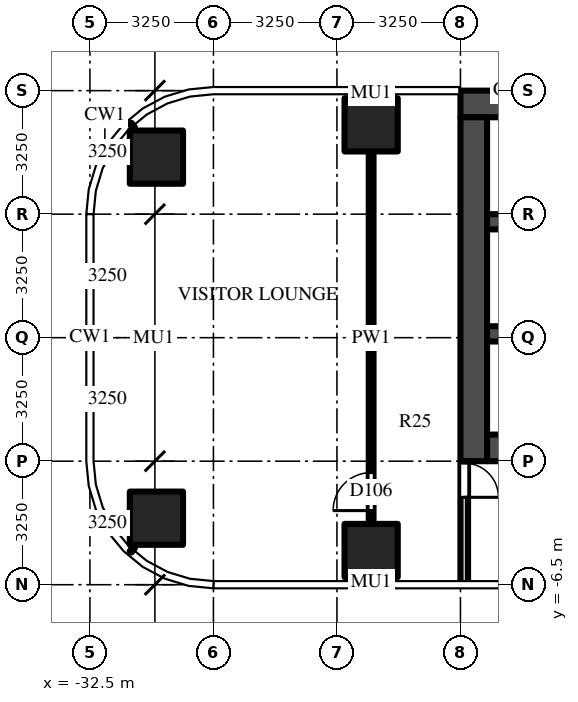
"""IFC4 building model, lengths in metres.
Left out: names, types, materials, properties, quantities, classifications, styles, units other than length and angle.
Written with IfcOpenShell. Run it as: python <this file> out.ifc"""

import sys

from ifc_helpers import new_model, si_unit, direction, frame, frame_2d, origin, origin_2d, place, context, subcontext, project, spatial, rectangle, extrude, source, transform, mapped, element, fill, save


model = new_model("IFC4")
c1 = context("Model", 3, precision=1e-05, world=origin(), true_north=direction((0.0, 1.0)))
c2 = subcontext(c1, "Body", "Model", "MODEL_VIEW")
j1 = project(units=[si_unit("LENGTHUNIT", "METRE"), si_unit("PLANEANGLEUNIT", "RADIAN")], contexts=[c1])
p1 = place(None, origin())
s1 = spatial("IfcSite", under=j1, at=p1, CompositionType="ELEMENT")
p2 = place(p1, origin())
s2 = spatial("IfcBuilding", under=s1, at=p2, CompositionType="ELEMENT")
p3 = place(p2, frame((0.0, 0.0, 47.5)))
s3 = spatial("IfcBuildingStorey", under=s2, at=p3, CompositionType="ELEMENT", Elevation=47.5)
m1 = source(origin(), c2, "Body", "SweptSolid", [
    extrude(rectangle(XDim=1.4, YDim=1.4, at=origin_2d()), origin(), (0.0, 0.0, 1.0), 4.5),
])
for number, where, z_axis, x_axis in (
    (1, (-25.1, -5.6, 0.0), (0.0, 0.0, 1.0), (1.0, 0.0, 0.0)),
    (2, (-30.75, -4.75, 0.0), (0.0, 0.0, 1.0), (1.0, 0.0, 0.0)),
    (3, (-25.1, 5.6, 0.0), (0.0, 0.0, 1.0), (1.0, 0.0, 0.0)),
    (4, (-30.75, 4.75, 0.0), (0.0, 0.0, 1.0), (1.0, 0.0, 0.0)),
):
    element("IfcColumn", number, at=place(p3, frame(where, z_axis=z_axis, x_axis=x_axis)), inside=s3, PredefinedType="COLUMN", context=c2, shape_type="MappedRepresentation", body=[
        mapped(m1, transform((0.0, 0.0, 0.0))),
    ])
m2 = source(origin(), c2, "Body", "SweptSolid", [
    extrude(rectangle(XDim=16.45, YDim=0.7, at=frame_2d((8.225, 0.0))), origin(), (0.0, 0.0, 1.0), 4.25),
])
p4 = place(p3, frame((-6.3, 6.15, 0.0), z_axis=(0.0, 0.0, 1.0), x_axis=(-1.0, 0.0, 0.0)))
e5 = element("IfcWall", 5, at=p4, inside=s3, PredefinedType="SHEAR", context=c2, shape_type="MappedRepresentation", body=[
    mapped(m2, transform((0.0, 0.0, 0.0))),
])
m3 = source(origin(), c2, "Body", "SweptSolid", [
    extrude(rectangle(XDim=14.85, YDim=0.7, at=frame_2d((7.425, 0.0))), origin(), (0.0, 0.0, 1.0), 4.25),
])
p5 = place(p3, frame((-7.2, -2.9, 0.0), z_axis=(0.0, 0.0, 1.0), x_axis=(-1.0, 0.0, 0.0)))
e6 = element("IfcWall", 6, at=p5, inside=s3, PredefinedType="SHEAR", context=c2, shape_type="MappedRepresentation", body=[
    mapped(m3, transform((0.0, 0.0, 0.0))),
])
m4 = source(origin(), c2, "Body", "SweptSolid", [
    extrude(rectangle(XDim=1.3, YDim=2.1, at=frame_2d((0.65, 1.05))), frame((0.0, 0.36, 0.0), z_axis=(0.0, -1.0, 0.0), x_axis=(1.0, 0.0, 0.0)), (0.0, 0.0, 1.0), 0.72),
])
p6 = place(p5, frame((12.2, 0.0, 0.0)))
e7 = element("IfcOpeningElement", 7, at=p6, cuts=e6, PredefinedType="OPENING", context=c2, shape_type="MappedRepresentation", body=[
    mapped(m4, transform((0.0, 0.0, 0.0))),
])
m5 = source(origin(), c2, "Body", "SweptSolid", [
    extrude(rectangle(XDim=1.2, YDim=2.1, at=frame_2d((0.6, 1.05))), frame((0.0, 0.36, 0.0), z_axis=(0.0, -1.0, 0.0), x_axis=(1.0, 0.0, 0.0)), (0.0, 0.0, 1.0), 0.72),
])
p7 = place(p5, frame((9.85, 0.0, 0.0)))
e8 = element("IfcOpeningElement", 8, at=p7, cuts=e6, PredefinedType="OPENING", context=c2, shape_type="MappedRepresentation", body=[
    mapped(m5, transform((0.0, 0.0, 0.0))),
])
m6 = source(origin(), c2, "Body", "SweptSolid", [
    extrude(rectangle(XDim=1.0, YDim=2.1, at=frame_2d((0.5, 1.05))), frame((0.0, 0.36, 0.0), z_axis=(0.0, -1.0, 0.0), x_axis=(1.0, 0.0, 0.0)), (0.0, 0.0, 1.0), 0.72),
])
p8 = place(p5, frame((7.9, 0.0, 0.0)))
e9 = element("IfcOpeningElement", 9, at=p8, cuts=e6, PredefinedType="OPENING", context=c2, shape_type="MappedRepresentation", body=[
    mapped(m6, transform((0.0, 0.0, 0.0))),
])
m7 = source(origin(), c2, "Body", "SweptSolid", [
    extrude(rectangle(XDim=0.8, YDim=2.1, at=frame_2d((0.4, 1.05))), frame((0.0, 0.36, 0.0), z_axis=(0.0, -1.0, 0.0), x_axis=(1.0, 0.0, 0.0)), (0.0, 0.0, 1.0), 0.72),
])
p9 = place(p5, frame((0.113, 0.0, 0.0)))
e10 = element("IfcOpeningElement", 10, at=p9, cuts=e6, PredefinedType="OPENING", context=c2, shape_type="MappedRepresentation", body=[
    mapped(m7, transform((0.0, 0.0, 0.0))),
])
p10 = place(p5, frame((1.288, 0.0, 0.0)))
e11 = element("IfcOpeningElement", 11, at=p10, cuts=e6, PredefinedType="OPENING", context=c2, shape_type="MappedRepresentation", body=[
    mapped(m7, transform((0.0, 0.0, 0.0))),
])
p11 = place(p5, frame((2.712, 0.0, 0.0)))
e12 = element("IfcOpeningElement", 12, at=p11, cuts=e6, PredefinedType="OPENING", context=c2, shape_type="MappedRepresentation", body=[
    mapped(m7, transform((0.0, 0.0, 0.0))),
])
p12 = place(p5, frame((3.887, 0.0, 0.0)))
e13 = element("IfcOpeningElement", 13, at=p12, cuts=e6, PredefinedType="OPENING", context=c2, shape_type="MappedRepresentation", body=[
    mapped(m7, transform((0.0, 0.0, 0.0))),
])
p13 = place(p5, frame((5.312, 0.0, 0.0)))
e14 = element("IfcOpeningElement", 14, at=p13, cuts=e6, PredefinedType="OPENING", context=c2, shape_type="MappedRepresentation", body=[
    mapped(m7, transform((0.0, 0.0, 0.0))),
])
p14 = place(p5, frame((6.488, 0.0, 0.0)))
e15 = element("IfcOpeningElement", 15, at=p14, cuts=e6, PredefinedType="OPENING", context=c2, shape_type="MappedRepresentation", body=[
    mapped(m7, transform((0.0, 0.0, 0.0))),
])
m8 = source(origin(), c2, "Body", "SweptSolid", [
    extrude(rectangle(XDim=9.05, YDim=0.7, at=frame_2d((4.525, 0.0))), origin(), (0.0, 0.0, 1.0), 4.25),
])
p15 = place(p3, frame((-22.4, 5.8, 0.0), z_axis=(0.0, 0.0, 1.0), x_axis=(0.0, -1.0, 0.0)))
e16 = element("IfcWall", 16, at=p15, inside=s3, PredefinedType="SHEAR", context=c2, shape_type="MappedRepresentation", body=[
    mapped(m8, transform((0.0, 0.0, 0.0))),
])
m9 = source(origin(), c2, "Body", "SweptSolid", [
    extrude(rectangle(XDim=14.85, YDim=0.4, at=frame_2d((7.425, 0.0))), origin(), (0.0, 0.0, 1.0), 4.25),
])
p16 = place(p3, frame((-7.2, 0.1, 0.0), z_axis=(0.0, 0.0, 1.0), x_axis=(-1.0, 0.0, 0.0)))
e17 = element("IfcWall", 17, at=p16, inside=s3, PredefinedType="SHEAR", context=c2, shape_type="MappedRepresentation", body=[
    mapped(m9, transform((0.0, 0.0, 0.0))),
])
m10 = source(origin(), c2, "Body", "SweptSolid", [
    extrude(rectangle(XDim=1.0, YDim=2.1, at=frame_2d((0.5, 1.05))), frame((0.0, 0.21, 0.0), z_axis=(0.0, -1.0, 0.0), x_axis=(1.0, 0.0, 0.0)), (0.0, 0.0, 1.0), 0.42),
])
p17 = place(p16, frame((7.9, 0.0, 0.0)))
e18 = element("IfcOpeningElement", 18, at=p17, cuts=e17, PredefinedType="OPENING", context=c2, shape_type="MappedRepresentation", body=[
    mapped(m10, transform((0.0, 0.0, 0.0))),
])
m11 = source(origin(), c2, "Body", "SweptSolid", [
    extrude(rectangle(XDim=5.7, YDim=0.4, at=frame_2d((2.85, 0.0))), origin(), (0.0, 0.0, 1.0), 4.25),
])
p18 = place(p3, frame((-16.35, 3.05, 0.0), z_axis=(0.0, 0.0, 1.0), x_axis=(-1.0, 0.0, 0.0)))
e19 = element("IfcWall", 19, at=p18, inside=s3, PredefinedType="SHEAR", context=c2, shape_type="MappedRepresentation", body=[
    mapped(m11, transform((0.0, 0.0, 0.0))),
])
m12 = source(origin(), c2, "Body", "SweptSolid", [
    extrude(rectangle(XDim=3.25, YDim=0.2, at=frame_2d((1.625, 0.0))), origin(), (0.0, 0.0, 1.0), 4.25),
])
p19 = place(p3, frame((-22.65, -3.25, 0.0), z_axis=(0.0, 0.0, 1.0), x_axis=(0.0, -1.0, 0.0)))
e20 = element("IfcWall", 20, at=p19, inside=s3, PredefinedType="PARTITIONING", context=c2, shape_type="MappedRepresentation", body=[
    mapped(m12, transform((0.0, 0.0, 0.0))),
])
m13 = source(origin(), c2, "Body", "SweptSolid", [
    extrude(rectangle(XDim=0.9, YDim=2.1, at=frame_2d((0.45, 1.05))), frame((0.0, 0.11, 0.0), z_axis=(0.0, -1.0, 0.0), x_axis=(1.0, 0.0, 0.0)), (0.0, 0.0, 1.0), 0.22),
])
p20 = place(p19, frame((0.05, 0.0, 0.0)))
e21 = element("IfcOpeningElement", 21, at=p20, cuts=e20, PredefinedType="OPENING", context=c2, shape_type="MappedRepresentation", body=[
    mapped(m13, transform((0.0, 0.0, 0.0))),
])
m14 = source(origin(), c2, "Body", "SweptSolid", [
    extrude(rectangle(XDim=9.8, YDim=0.125, at=frame_2d((4.9, 0.0))), origin(), (0.0, 0.0, 1.0), 3.468),
])
p21 = place(p3, frame((-25.1, -4.9, 0.0), z_axis=(0.0, 0.0, 1.0), x_axis=(0.0, 1.0, 0.0)))
e22 = element("IfcWall", 22, at=p21, inside=s3, PredefinedType="PARTITIONING", context=c2, shape_type="MappedRepresentation", body=[
    mapped(m14, transform((0.0, 0.0, 0.0))),
])
m15 = source(origin(), c2, "Body", "SweptSolid", [
    extrude(rectangle(XDim=1.0, YDim=2.1, at=frame_2d((0.5, 1.05))), frame((0.0, 0.073, 0.0), z_axis=(0.0, -1.0, 0.0), x_axis=(1.0, 0.0, 0.0)), (0.0, 0.0, 1.0), 0.145),
])
p22 = place(p21, frame((0.35, 0.0, 0.0)))
e23 = element("IfcOpeningElement", 23, at=p22, cuts=e22, PredefinedType="OPENING", context=c2, shape_type="MappedRepresentation", body=[
    mapped(m15, transform((0.0, 0.0, 0.0))),
])
m16 = source(origin(), c2, "Body", "SweptSolid", [
    extrude(rectangle(XDim=0.9, YDim=2.1, at=frame_2d((0.45, 1.05))), frame((0.0, 0.025, 0.0), z_axis=(0.0, -1.0, 0.0), x_axis=(1.0, 0.0, 0.0)), (0.0, 0.0, 1.0), 0.05),
])
p23 = place(p20, origin())
e24 = element("IfcDoor", 24, at=p23, inside=s3, OperationType="SINGLE_SWING_RIGHT", PredefinedType="DOOR", context=c2, shape_type="MappedRepresentation", body=[
    mapped(m16, transform((0.0, 0.0, 0.0))),
])
fill(e21, e24)
m17 = source(origin(), c2, "Body", "SweptSolid", [
    extrude(rectangle(XDim=1.0, YDim=2.1, at=frame_2d((0.5, 1.05))), frame((0.0, 0.025, 0.0), z_axis=(0.0, -1.0, 0.0), x_axis=(1.0, 0.0, 0.0)), (0.0, 0.0, 1.0), 0.05),
])
p24 = place(p22, origin())
e25 = element("IfcDoor", 25, at=p24, inside=s3, OperationType="SINGLE_SWING_LEFT", PredefinedType="DOOR", context=c2, shape_type="MappedRepresentation", body=[
    mapped(m17, transform((0.0, 0.0, 0.0))),
])
fill(e23, e25)
save(model, sys.argv[1])
